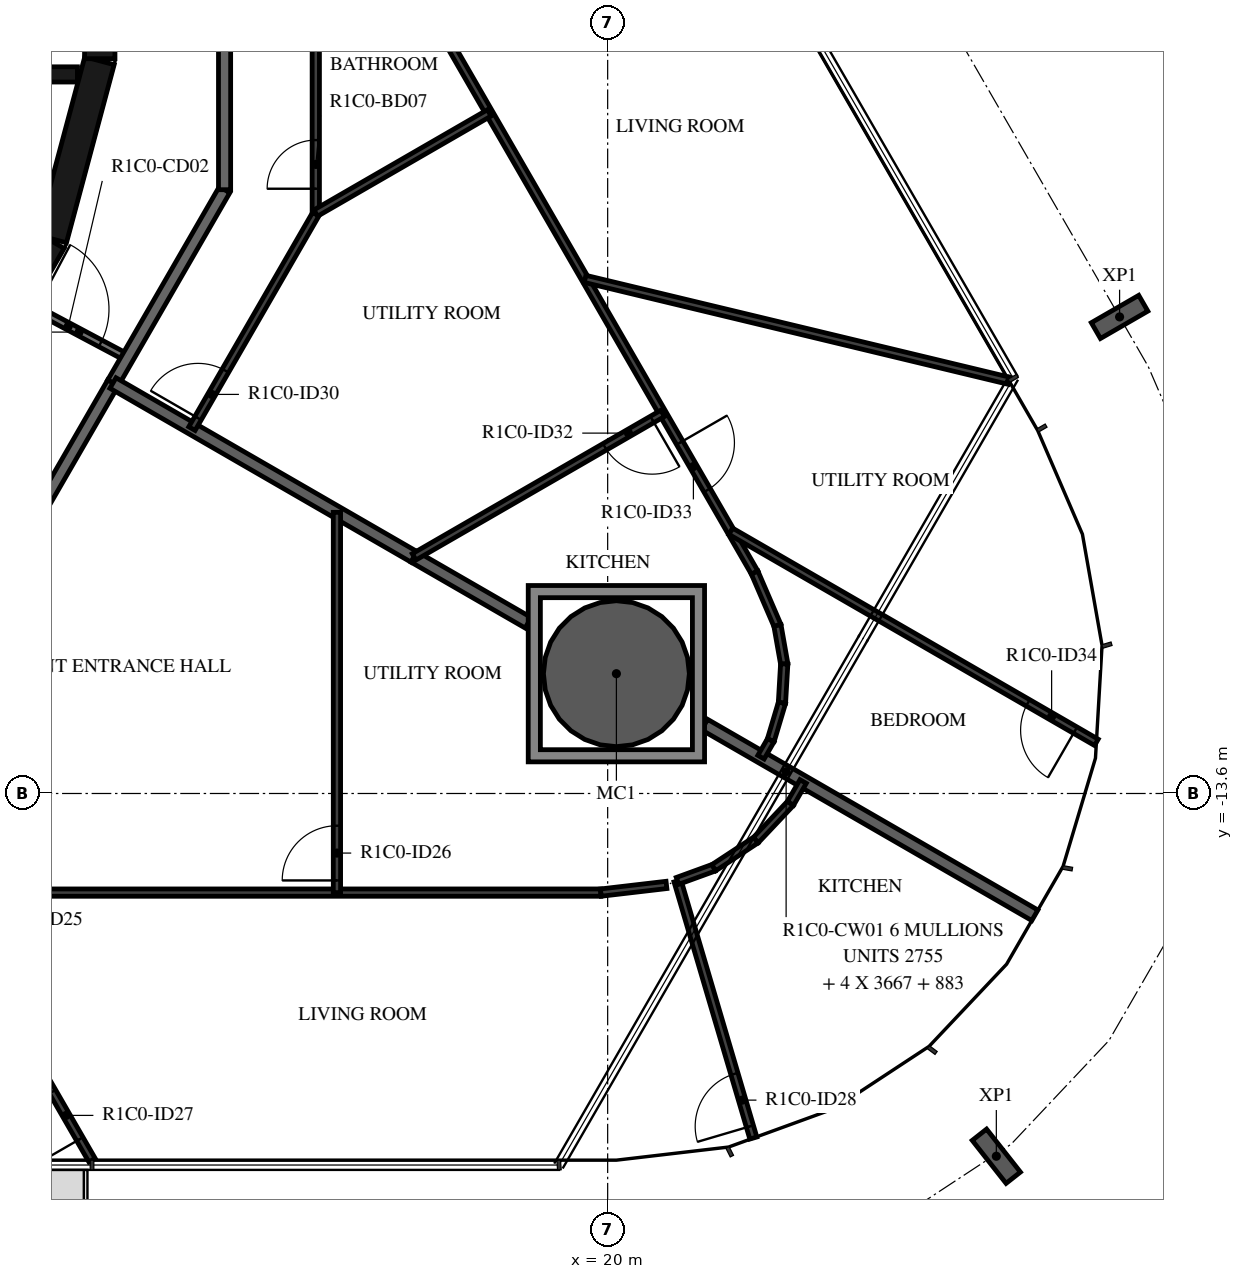
"""IFC4 building model, lengths in metres.
Left out: names, types, materials, properties, quantities, classifications, styles, units other than length and angle.
Written with IfcOpenShell. Run it as: python <this file> out.ifc"""

import sys

from ifc_helpers import new_model, si_unit, direction, frame, frame_2d, origin, origin_2d, place, context, subcontext, project, spatial, polyline, rectangle, hollow_circle, i_section, outline, extrude, element, fill, save


model = new_model("IFC4")
c1 = context("Model", 3, precision=1e-05, world=origin(), true_north=direction((0.0, 1.0)))
c2 = subcontext(c1, "Body", "Model", "MODEL_VIEW")
j1 = project(units=[si_unit("LENGTHUNIT", "METRE"), si_unit("PLANEANGLEUNIT", "RADIAN")], contexts=[c1])
p1 = place(None, origin())
s1 = spatial("IfcSite", under=j1, at=p1, CompositionType="ELEMENT")
p2 = place(p1, origin())
s2 = spatial("IfcBuilding", under=s1, at=p2, CompositionType="ELEMENT")
p3 = place(p2, frame((0.0, 0.0, 59.4)))
s3 = spatial("IfcBuildingStorey", under=s2, at=p3, CompositionType="ELEMENT", Elevation=59.4)
p4 = place(p3, frame((20.144, -11.63, -0.38), z_axis=(0.0, 0.0, 1.0), x_axis=(1.0, 0.0, 0.0)))
e1 = element("IfcColumn", 1, at=p4, inside=s3, PredefinedType="COLUMN", context=c2, shape_type="SweptSolid", body=[
    extrude(hollow_circle(Radius=1.2, WallThickness=0.06, at=origin_2d()), origin(), (0.0, 0.0, 1.0), 3.5),
])
for number, where, z_axis, x_axis in (
    (2, (26.392, -19.565, -0.38), (0.0, 0.0, 1.0), (-0.786, -0.619, 0.0)),
    (3, (28.419, -5.763, -0.38), (0.0, 0.0, 1.0), (0.5, -0.866, 0.0)),
):
    element("IfcColumn", number, at=place(p3, frame(where, z_axis=z_axis, x_axis=x_axis)), inside=s3, PredefinedType="COLUMN", context=c2, shape_type="SweptSolid", body=[
        extrude(i_section(OverallWidth=0.3, OverallDepth=0.9, WebThickness=0.019, FlangeThickness=0.035, FilletRadius=0.03, at=origin_2d()), origin(), (0.0, 0.0, 1.0), 3.5),
    ])
for number, where, z_axis, x_axis in (
    (4, (9.329, -7.137, 0.0), (0.0, 0.0, 1.0), (0.5, 0.866, 0.0)),
    (5, (10.858, -4.479, 0.0), (0.0, 0.0, 1.0), (0.259, 0.966, 0.0)),
):
    element("IfcWall", number, at=place(p3, frame(where, z_axis=z_axis, x_axis=x_axis)), inside=s3, PredefinedType="SHEAR", context=c2, shape_type="SweptSolid", body=[
        extrude(rectangle(XDim=3.033, YDim=0.5, at=frame_2d((1.516, 0.0))), origin(), (0.0, 0.0, 1.0), 3.12),
    ])
p5 = place(p3, frame((11.647, -1.516, 0.0), z_axis=(0.0, 0.0, 1.0), x_axis=(0.0, 1.0, 0.0)))
e6 = element("IfcWall", 6, at=p5, inside=s3, PredefinedType="SHEAR", context=c2, shape_type="SweptSolid", body=[
    extrude(rectangle(XDim=3.033, YDim=0.5, at=frame_2d((1.516, 0.0))), origin(), (0.0, 0.0, 1.0), 3.12),
])
p6 = place(p5, frame((0.616, 0.0, 0.0)))
e7 = element("IfcOpeningElement", 7, at=p6, cuts=e6, PredefinedType="OPENING", context=c2, shape_type="SweptSolid", body=[
    extrude(rectangle(XDim=1.8, YDim=2.1, at=frame_2d((0.9, 1.05))), frame((0.0, 0.26, 0.0), z_axis=(0.0, -1.0, 0.0), x_axis=(1.0, 0.0, 0.0)), (0.0, 0.0, 1.0), 0.52),
])
p7 = place(p3, frame((3.35, -1.775, 0.0), z_axis=(0.0, 0.0, 1.0), x_axis=(1.0, 0.0, 0.0)))
e8 = element("IfcWall", 8, at=p7, inside=s3, PredefinedType="SHEAR", context=c2, shape_type="SweptSolid", body=[
    extrude(rectangle(XDim=7.93, YDim=0.25, at=frame_2d((3.965, 0.0))), origin(), (0.0, 0.0, 1.0), 3.12),
])
p8 = place(p7, frame((0.4, 0.0, 0.0)))
e9 = element("IfcOpeningElement", 9, at=p8, cuts=e8, PredefinedType="OPENING", context=c2, shape_type="SweptSolid", body=[
    extrude(rectangle(XDim=1.1, YDim=2.4, at=frame_2d((0.55, 1.2))), frame((0.0, 0.135, 0.0), z_axis=(0.0, -1.0, 0.0), x_axis=(1.0, 0.0, 0.0)), (0.0, 0.0, 1.0), 0.27),
])
p9 = place(p7, frame((2.55, 0.0, 0.0)))
e10 = element("IfcOpeningElement", 10, at=p9, cuts=e8, PredefinedType="OPENING", context=c2, shape_type="SweptSolid", body=[
    extrude(rectangle(XDim=1.1, YDim=2.4, at=frame_2d((0.55, 1.2))), frame((0.0, 0.135, 0.0), z_axis=(0.0, -1.0, 0.0), x_axis=(1.0, 0.0, 0.0)), (0.0, 0.0, 1.0), 0.27),
])
p10 = place(p7, frame((4.7, 0.0, 0.0)))
e11 = element("IfcOpeningElement", 11, at=p10, cuts=e8, PredefinedType="OPENING", context=c2, shape_type="SweptSolid", body=[
    extrude(rectangle(XDim=1.1, YDim=2.4, at=frame_2d((0.55, 1.2))), frame((0.0, 0.135, 0.0), z_axis=(0.0, -1.0, 0.0), x_axis=(1.0, 0.0, 0.0)), (0.0, 0.0, 1.0), 0.27),
])
p11 = place(p3, frame((10.511, -5.589, 0.0), z_axis=(0.0, 0.0, 1.0), x_axis=(0.88294043061, -0.469485032769, 0.0)))
e12 = element("IfcWall", 12, at=p11, inside=s3, PredefinedType="PARTITIONING", context=c2, shape_type="SweptSolid", body=[
    extrude(rectangle(XDim=1.804, YDim=0.12, at=frame_2d((0.902, 0.0))), origin(), (0.0, 0.0, 1.0), 3.12),
])
p12 = place(p11, frame((0.1, 0.0, 0.0)))
e13 = element("IfcOpeningElement", 13, at=p12, cuts=e12, PredefinedType="OPENING", context=c2, shape_type="SweptSolid", body=[
    extrude(rectangle(XDim=1.2, YDim=2.1, at=frame_2d((0.6, 1.05))), frame((0.0, 0.07, 0.0), z_axis=(0.0, -1.0, 0.0), x_axis=(1.0, 0.0, 0.0)), (0.0, 0.0, 1.0), 0.14),
])
p13 = place(p3, frame((11.865, -6.85, 0.0), z_axis=(0.0, 0.0, 1.0), x_axis=(0.499987270552, 0.86603275301, 0.0)))
e14 = element("IfcWall", 14, at=p13, inside=s3, PredefinedType="STANDARD", context=c2, shape_type="SweptSolid", body=[
    extrude(rectangle(XDim=3.671, YDim=0.2, at=frame_2d((1.835, 0.0))), origin(), (0.0, 0.0, 1.0), 3.12),
])
p14 = place(p3, frame((13.7, -3.671, 0.0), z_axis=(0.0, 0.0, 1.0), x_axis=(0.0, 1.0, 0.0)))
e15 = element("IfcWall", 15, at=p14, inside=s3, PredefinedType="STANDARD", context=c2, shape_type="SweptSolid", body=[
    extrude(rectangle(XDim=7.146, YDim=0.2, at=frame_2d((3.573, 0.0))), origin(), (0.0, 0.0, 1.0), 3.12),
])
p15 = place(p14, frame((5.947, 0.0, 0.0)))
e16 = element("IfcOpeningElement", 16, at=p15, cuts=e15, PredefinedType="OPENING", context=c2, shape_type="SweptSolid", body=[
    extrude(rectangle(XDim=1.0, YDim=2.1, at=frame_2d((0.5, 1.05))), frame((0.0, 0.11, 0.0), z_axis=(0.0, -1.0, 0.0), x_axis=(1.0, 0.0, 0.0)), (0.0, 0.0, 1.0), 0.22),
])
p16 = place(p3, frame((10.029, -10.029, 0.0), z_axis=(0.0, 0.0, 1.0), x_axis=(0.50001606911, 0.866016126081, 0.0)))
e17 = element("IfcWall", 17, at=p16, inside=s3, PredefinedType="STANDARD", context=c2, shape_type="SweptSolid", body=[
    extrude(rectangle(XDim=3.671, YDim=0.2, at=frame_2d((1.835, 0.0))), origin(), (0.0, 0.0, 1.0), 3.12),
])
p17 = place(p3, frame((16.817, -9.709, 0.0), z_axis=(0.0, 0.0, 1.0), x_axis=(-0.86604338933, 0.499968846828, 0.0)))
e18 = element("IfcWall", 18, at=p17, inside=s3, PredefinedType="STANDARD", context=c2, shape_type="SweptSolid", body=[
    extrude(rectangle(XDim=5.718, YDim=0.2, at=frame_2d((2.859, 0.0))), origin(), (0.0, 0.0, 1.0), 3.12),
])
p18 = place(p3, frame((27.025, -15.603, 0.0), z_axis=(0.0, 0.0, 1.0), x_axis=(-0.866030653443, 0.499990907215, 0.0)))
e19 = element("IfcWall", 19, at=p18, inside=s3, PredefinedType="STANDARD", context=c2, shape_type="SweptSolid", body=[
    extrude(rectangle(XDim=6.271, YDim=0.2, at=frame_2d((3.136, 0.0))), origin(), (0.0, 0.0, 1.0), 3.12),
])
p19 = place(p3, frame((18.694, -10.793, 0.0), z_axis=(0.0, 0.0, 1.0), x_axis=(-0.866009251978, 0.500027974705, 0.0)))
e20 = element("IfcWall", 20, at=p19, inside=s3, PredefinedType="STANDARD", context=c2, shape_type="SweptSolid", body=[
    extrude(rectangle(XDim=2.167, YDim=0.2, at=frame_2d((1.084, 0.0))), origin(), (0.0, 0.0, 1.0), 3.12),
])
p20 = place(p3, frame((7.881, -15.23, 0.0), z_axis=(0.0, 0.0, 1.0), x_axis=(1.0, 0.0, 0.0)))
e21 = element("IfcWall", 21, at=p20, inside=s3, PredefinedType="PARTITIONING", context=c2, shape_type="SweptSolid", body=[
    extrude(rectangle(XDim=12.006, YDim=0.12, at=frame_2d((6.003, 0.0))), origin(), (0.0, 0.0, 1.0), 3.12),
])
p21 = place(p20, frame((1.499, 0.0, 0.0)))
e22 = element("IfcOpeningElement", 22, at=p21, cuts=e21, PredefinedType="OPENING", context=c2, shape_type="SweptSolid", body=[
    extrude(rectangle(XDim=0.9, YDim=2.1, at=frame_2d((0.45, 1.05))), frame((0.0, 0.07, 0.0), z_axis=(0.0, -1.0, 0.0), x_axis=(1.0, 0.0, 0.0)), (0.0, 0.0, 1.0), 0.14),
])
p22 = place(p3, frame((15.548, -15.23, 0.0), z_axis=(0.0, 0.0, 1.0), x_axis=(0.0, 1.0, 0.0)))
e23 = element("IfcWall", 23, at=p22, inside=s3, PredefinedType="PARTITIONING", context=c2, shape_type="SweptSolid", body=[
    extrude(rectangle(XDim=6.253, YDim=0.12, at=frame_2d((3.127, 0.0))), origin(), (0.0, 0.0, 1.0), 3.12),
])
p23 = place(p22, frame((0.2, 0.0, 0.0)))
e24 = element("IfcOpeningElement", 24, at=p23, cuts=e23, PredefinedType="OPENING", context=c2, shape_type="SweptSolid", body=[
    extrude(rectangle(XDim=0.9, YDim=2.1, at=frame_2d((0.45, 1.05))), frame((0.0, 0.07, 0.0), z_axis=(0.0, -1.0, 0.0), x_axis=(1.0, 0.0, 0.0)), (0.0, 0.0, 1.0), 0.14),
])
p24 = place(p3, frame((11.52, -19.63, 0.0), z_axis=(0.0, 0.0, 1.0), x_axis=(-0.499999763888, 0.866025540104, 0.0)))
e25 = element("IfcWall", 25, at=p24, inside=s3, PredefinedType="PARTITIONING", context=c2, shape_type="SweptSolid", body=[
    extrude(rectangle(XDim=5.081, YDim=0.12, at=frame_2d((2.54, 0.0))), origin(), (0.0, 0.0, 1.0), 3.12),
])
p25 = place(p24, frame((0.4, 0.0, 0.0)))
e26 = element("IfcOpeningElement", 26, at=p25, cuts=e25, PredefinedType="OPENING", context=c2, shape_type="SweptSolid", body=[
    extrude(rectangle(XDim=0.9, YDim=2.1, at=frame_2d((0.45, 1.05))), frame((0.0, 0.07, 0.0), z_axis=(0.0, -1.0, 0.0), x_axis=(1.0, 0.0, 0.0)), (0.0, 0.0, 1.0), 0.14),
])
p26 = place(p3, frame((20.967, -15.104, 0.0), z_axis=(0.0, 0.0, 1.0), x_axis=(-0.993231641151, -0.116150363826, 0.0)))
e27 = element("IfcWall", 27, at=p26, inside=s3, PredefinedType="PARTITIONING", context=c2, shape_type="SweptSolid", body=[
    extrude(rectangle(XDim=1.087, YDim=0.12, at=frame_2d((0.543, 0.0))), origin(), (0.0, 0.0, 1.0), 3.12),
])
p27 = place(p3, frame((22.396, -19.266, 0.0), z_axis=(0.0, 0.0, 1.0), x_axis=(-0.282873823334, 0.959157130022, 0.0)))
e28 = element("IfcWall", 28, at=p27, inside=s3, PredefinedType="PARTITIONING", context=c2, shape_type="SweptSolid", body=[
    extrude(rectangle(XDim=4.409, YDim=0.12, at=frame_2d((2.204, 0.0))), origin(), (0.0, 0.0, 1.0), 3.12),
])
p28 = place(p27, frame((0.2, 0.0, 0.0)))
e29 = element("IfcOpeningElement", 29, at=p28, cuts=e28, PredefinedType="OPENING", context=c2, shape_type="SweptSolid", body=[
    extrude(rectangle(XDim=0.9, YDim=2.1, at=frame_2d((0.45, 1.05))), frame((0.0, 0.07, 0.0), z_axis=(0.0, -1.0, 0.0), x_axis=(1.0, 0.0, 0.0)), (0.0, 0.0, 1.0), 0.14),
])
p29 = place(p3, frame((21.149, -15.038, 0.0), z_axis=(0.0, 0.0, 1.0), x_axis=(0.939726102094, 0.341928140173, 0.0)))
e30 = element("IfcWall", 30, at=p29, inside=s3, PredefinedType="PARTITIONING", context=c2, shape_type="SweptSolid", body=[
    extrude(rectangle(XDim=0.635, YDim=0.12, at=frame_2d((0.318, 0.0))), origin(), (0.0, 0.0, 1.0), 3.12),
])
p30 = place(p3, frame((21.746, -14.82, 0.0), z_axis=(0.0, 0.0, 1.0), x_axis=(0.835477570013, 0.549524549046, 0.0)))
e31 = element("IfcWall", 31, at=p30, inside=s3, PredefinedType="PARTITIONING", context=c2, shape_type="SweptSolid", body=[
    extrude(rectangle(XDim=0.829, YDim=0.12, at=frame_2d((0.415, 0.0))), origin(), (0.0, 0.0, 1.0), 3.12),
])
p31 = place(p3, frame((22.438, -14.365, 0.0), z_axis=(0.0, 0.0, 1.0), x_axis=(0.686182189596, 0.727429723535, 0.0)))
e32 = element("IfcWall", 32, at=p31, inside=s3, PredefinedType="PARTITIONING", context=c2, shape_type="SweptSolid", body=[
    extrude(rectangle(XDim=0.829, YDim=0.12, at=frame_2d((0.414, 0.0))), origin(), (0.0, 0.0, 1.0), 3.12),
])
p32 = place(p3, frame((23.007, -13.762, 0.0), z_axis=(0.0, 0.0, 1.0), x_axis=(0.499875358948, 0.866097353371, 0.0)))
e33 = element("IfcWall", 33, at=p32, inside=s3, PredefinedType="PARTITIONING", context=c2, shape_type="SweptSolid", body=[
    extrude(rectangle(XDim=0.415, YDim=0.12, at=frame_2d((0.207, 0.0))), origin(), (0.0, 0.0, 1.0), 3.12),
])
p33 = place(p3, frame((13.164, -7.6, 0.0), z_axis=(0.0, 0.0, 1.0), x_axis=(0.499974973053, 0.866039852617, 0.0)))
e34 = element("IfcWall", 34, at=p33, inside=s3, PredefinedType="PARTITIONING", context=c2, shape_type="SweptSolid", body=[
    extrude(rectangle(XDim=4.073, YDim=0.12, at=frame_2d((2.037, 0.0))), origin(), (0.0, 0.0, 1.0), 3.12),
])
p34 = place(p33, frame((0.2, 0.0, 0.0)))
e35 = element("IfcOpeningElement", 35, at=p34, cuts=e34, PredefinedType="OPENING", context=c2, shape_type="SweptSolid", body=[
    extrude(rectangle(XDim=0.9, YDim=2.1, at=frame_2d((0.45, 1.05))), frame((0.0, 0.07, 0.0), z_axis=(0.0, -1.0, 0.0), x_axis=(1.0, 0.0, 0.0)), (0.0, 0.0, 1.0), 0.14),
])
p35 = place(p3, frame((15.2, -4.055, 0.0), z_axis=(0.0, 0.0, 1.0), x_axis=(0.0, 1.0, 0.0)))
e36 = element("IfcWall", 36, at=p35, inside=s3, PredefinedType="PARTITIONING", context=c2, shape_type="SweptSolid", body=[
    extrude(rectangle(XDim=6.588, YDim=0.12, at=frame_2d((3.294, 0.0))), origin(), (0.0, 0.0, 1.0), 3.12),
])
p36 = place(p35, frame((0.4, 0.0, 0.0)))
e37 = element("IfcOpeningElement", 37, at=p36, cuts=e36, PredefinedType="OPENING", context=c2, shape_type="SweptSolid", body=[
    extrude(rectangle(XDim=0.8, YDim=2.1, at=frame_2d((0.4, 1.05))), frame((0.0, 0.07, 0.0), z_axis=(0.0, -1.0, 0.0), x_axis=(1.0, 0.0, 0.0)), (0.0, 0.0, 1.0), 0.14),
])
p37 = place(p3, frame((15.2, 2.533, 0.0), z_axis=(0.0, 0.0, 1.0), x_axis=(0.500001127339, -0.866024752914, 0.0)))
e38 = element("IfcWall", 38, at=p37, inside=s3, PredefinedType="PARTITIONING", context=c2, shape_type="SweptSolid", body=[
    extrude(rectangle(XDim=14.434, YDim=0.12, at=frame_2d((7.217, 0.0))), origin(), (0.0, 0.0, 1.0), 3.12),
])
p38 = place(p37, frame((11.97, 0.0, 0.0)))
e39 = element("IfcOpeningElement", 39, at=p38, cuts=e38, PredefinedType="OPENING", context=c2, shape_type="SweptSolid", body=[
    extrude(rectangle(XDim=0.9, YDim=2.1, at=frame_2d((0.45, 1.05))), frame((0.0, 0.07, 0.0), z_axis=(0.0, -1.0, 0.0), x_axis=(1.0, 0.0, 0.0)), (0.0, 0.0, 1.0), 0.14),
])
p39 = place(p3, frame((22.417, -9.968, 0.0), z_axis=(0.0, 0.0, 1.0), x_axis=(0.395971779074, -0.918262680379, 0.0)))
e40 = element("IfcWall", 40, at=p39, inside=s3, PredefinedType="PARTITIONING", context=c2, shape_type="SweptSolid", body=[
    extrude(rectangle(XDim=0.947, YDim=0.12, at=frame_2d((0.474, 0.0))), origin(), (0.0, 0.0, 1.0), 3.12),
])
p40 = place(p3, frame((22.792, -10.837, 0.0), z_axis=(0.0, 0.0, 1.0), x_axis=(0.17382873157, -0.984775899421, 0.0)))
e41 = element("IfcWall", 41, at=p40, inside=s3, PredefinedType="PARTITIONING", context=c2, shape_type="SweptSolid", body=[
    extrude(rectangle(XDim=0.642, YDim=0.12, at=frame_2d((0.321, 0.0))), origin(), (0.0, 0.0, 1.0), 3.12),
])
p41 = place(p3, frame((22.904, -11.469, 0.0), z_axis=(0.0, 0.0, 1.0), x_axis=(-0.05820906079, -0.998304415117, 0.0)))
e42 = element("IfcWall", 42, at=p41, inside=s3, PredefinedType="PARTITIONING", context=c2, shape_type="SweptSolid", body=[
    extrude(rectangle(XDim=0.642, YDim=0.12, at=frame_2d((0.321, 0.0))), origin(), (0.0, 0.0, 1.0), 3.12),
])
p42 = place(p3, frame((22.866, -12.11, 0.0), z_axis=(0.0, 0.0, 1.0), x_axis=(-0.286754684479, -0.958004045362, 0.0)))
e43 = element("IfcWall", 43, at=p42, inside=s3, PredefinedType="PARTITIONING", context=c2, shape_type="SweptSolid", body=[
    extrude(rectangle(XDim=0.642, YDim=0.12, at=frame_2d((0.321, 0.0))), origin(), (0.0, 0.0, 1.0), 3.12),
])
p43 = place(p3, frame((22.682, -12.725, 0.0), z_axis=(0.0, 0.0, 1.0), x_axis=(-0.500226934229, -0.865894343596, 0.0)))
e44 = element("IfcWall", 44, at=p43, inside=s3, PredefinedType="PARTITIONING", context=c2, shape_type="SweptSolid", body=[
    extrude(rectangle(XDim=0.321, YDim=0.12, at=frame_2d((0.161, 0.0))), origin(), (0.0, 0.0, 1.0), 3.12),
])
p44 = place(p3, frame((28.037, -12.759, 0.0), z_axis=(0.0, 0.0, 1.0), x_axis=(-0.866009909538, 0.500026835863, 0.0)))
e45 = element("IfcWall", 45, at=p44, inside=s3, PredefinedType="PARTITIONING", context=c2, shape_type="SweptSolid", body=[
    extrude(rectangle(XDim=6.943, YDim=0.12, at=frame_2d((3.471, 0.0))), origin(), (0.0, 0.0, 1.0), 3.12),
])
p45 = place(p44, frame((0.4, 0.0, 0.0)))
e46 = element("IfcOpeningElement", 46, at=p45, cuts=e45, PredefinedType="OPENING", context=c2, shape_type="SweptSolid", body=[
    extrude(rectangle(XDim=0.9, YDim=2.1, at=frame_2d((0.45, 1.05))), frame((0.0, 0.07, 0.0), z_axis=(0.0, -1.0, 0.0), x_axis=(1.0, 0.0, 0.0)), (0.0, 0.0, 1.0), 0.14),
])
p46 = place(p3, frame((20.905, -7.349, 0.0), z_axis=(0.0, 0.0, 1.0), x_axis=(-0.866032292145, -0.49998806882, 0.0)))
e47 = element("IfcWall", 47, at=p46, inside=s3, PredefinedType="PARTITIONING", context=c2, shape_type="SweptSolid", body=[
    extrude(rectangle(XDim=4.721, YDim=0.12, at=frame_2d((2.36, 0.0))), origin(), (0.0, 0.0, 1.0), 3.12),
])
p47 = place(p46, frame((0.2, 0.0, 0.0)))
e48 = element("IfcOpeningElement", 48, at=p47, cuts=e47, PredefinedType="OPENING", context=c2, shape_type="SweptSolid", body=[
    extrude(rectangle(XDim=0.9, YDim=2.1, at=frame_2d((0.45, 1.05))), frame((0.0, 0.07, 0.0), z_axis=(0.0, -1.0, 0.0), x_axis=(1.0, 0.0, 0.0)), (0.0, 0.0, 1.0), 0.14),
])
p48 = place(p3, frame((18.052, -2.408, 0.0), z_axis=(0.0, 0.0, 1.0), x_axis=(-0.866017718408, -0.500013311227, 0.0)))
e49 = element("IfcWall", 49, at=p48, inside=s3, PredefinedType="PARTITIONING", context=c2, shape_type="SweptSolid", body=[
    extrude(rectangle(XDim=3.294, YDim=0.12, at=frame_2d((1.647, 0.0))), origin(), (0.0, 0.0, 1.0), 3.12),
])
p49 = place(p3, frame((26.6, -6.813, 0.0), z_axis=(0.0, 0.0, 1.0), x_axis=(-0.972307508101, 0.23370517686, 0.0)))
e50 = element("IfcWall", 50, at=p49, inside=s3, PredefinedType="PARTITIONING", context=c2, shape_type="SweptSolid", body=[
    extrude(rectangle(XDim=7.17, YDim=0.12, at=frame_2d((3.585, 0.0))), origin(), (0.0, 0.0, 1.0), 3.12),
])
p50 = place(p3, origin())
e51 = element("IfcWall", 51, at=p50, inside=s3, PredefinedType="STANDARD", context=c2, shape_type="SweptSolid", body=[
    extrude(outline(polyline([(21.594, -10.18), (21.594, -13.08), (18.694, -13.08), (18.694, -10.18), (21.594, -10.18)]), holes=[polyline([(18.894, -12.88), (21.394, -12.88), (21.394, -10.38), (18.894, -10.38), (18.894, -12.88)])]), origin(), (0.0, 0.0, 1.0), 3.12),
])
p51 = place(p23, origin())
e52 = element("IfcDoor", 52, at=p51, inside=s3, OperationType="SINGLE_SWING_RIGHT", PredefinedType="DOOR", context=c2, shape_type="SweptSolid", body=[
    extrude(rectangle(XDim=0.9, YDim=2.1, at=frame_2d((0.45, 1.05))), frame((0.0, 0.025, 0.0), z_axis=(0.0, -1.0, 0.0), x_axis=(1.0, 0.0, 0.0)), (0.0, 0.0, 1.0), 0.05),
])
fill(e24, e52)
p52 = place(p25, origin())
e53 = element("IfcDoor", 53, at=p52, inside=s3, OperationType="SINGLE_SWING_LEFT", PredefinedType="DOOR", context=c2, shape_type="SweptSolid", body=[
    extrude(rectangle(XDim=0.9, YDim=2.1, at=frame_2d((0.45, 1.05))), frame((0.0, 0.025, 0.0), z_axis=(0.0, -1.0, 0.0), x_axis=(1.0, 0.0, 0.0)), (0.0, 0.0, 1.0), 0.05),
])
fill(e26, e53)
p53 = place(p28, origin())
e54 = element("IfcDoor", 54, at=p53, inside=s3, OperationType="SINGLE_SWING_RIGHT", PredefinedType="DOOR", context=c2, shape_type="SweptSolid", body=[
    extrude(rectangle(XDim=0.9, YDim=2.1, at=frame_2d((0.45, 1.05))), frame((0.0, 0.025, 0.0), z_axis=(0.0, -1.0, 0.0), x_axis=(1.0, 0.0, 0.0)), (0.0, 0.0, 1.0), 0.05),
])
fill(e29, e54)
p54 = place(p34, origin())
e55 = element("IfcDoor", 55, at=p54, inside=s3, OperationType="SINGLE_SWING_LEFT", PredefinedType="DOOR", context=c2, shape_type="SweptSolid", body=[
    extrude(rectangle(XDim=0.9, YDim=2.1, at=frame_2d((0.45, 1.05))), frame((0.0, 0.025, 0.0), z_axis=(0.0, -1.0, 0.0), x_axis=(1.0, 0.0, 0.0)), (0.0, 0.0, 1.0), 0.05),
])
fill(e35, e55)
p55 = place(p36, origin())
e56 = element("IfcDoor", 56, at=p55, inside=s3, OperationType="SINGLE_SWING_LEFT", PredefinedType="DOOR", context=c2, shape_type="SweptSolid", body=[
    extrude(rectangle(XDim=0.8, YDim=2.1, at=frame_2d((0.4, 1.05))), frame((0.0, 0.025, 0.0), z_axis=(0.0, -1.0, 0.0), x_axis=(1.0, 0.0, 0.0)), (0.0, 0.0, 1.0), 0.05),
])
fill(e37, e56)
p56 = place(p47, origin())
e57 = element("IfcDoor", 57, at=p56, inside=s3, OperationType="SINGLE_SWING_LEFT", PredefinedType="DOOR", context=c2, shape_type="SweptSolid", body=[
    extrude(rectangle(XDim=0.9, YDim=2.1, at=frame_2d((0.45, 1.05))), frame((0.0, 0.025, 0.0), z_axis=(0.0, -1.0, 0.0), x_axis=(1.0, 0.0, 0.0)), (0.0, 0.0, 1.0), 0.05),
])
fill(e48, e57)
p57 = place(p38, origin())
e58 = element("IfcDoor", 58, at=p57, inside=s3, OperationType="SINGLE_SWING_LEFT", PredefinedType="DOOR", context=c2, shape_type="SweptSolid", body=[
    extrude(rectangle(XDim=0.9, YDim=2.1, at=frame_2d((0.45, 1.05))), frame((0.0, 0.025, 0.0), z_axis=(0.0, -1.0, 0.0), x_axis=(1.0, 0.0, 0.0)), (0.0, 0.0, 1.0), 0.05),
])
fill(e39, e58)
p58 = place(p45, origin())
e59 = element("IfcDoor", 59, at=p58, inside=s3, OperationType="SINGLE_SWING_LEFT", PredefinedType="DOOR", context=c2, shape_type="SweptSolid", body=[
    extrude(rectangle(XDim=0.9, YDim=2.1, at=frame_2d((0.45, 1.05))), frame((0.0, 0.025, 0.0), z_axis=(0.0, -1.0, 0.0), x_axis=(1.0, 0.0, 0.0)), (0.0, 0.0, 1.0), 0.05),
])
fill(e46, e59)
p59 = place(p12, origin())
e60 = element("IfcDoor", 60, at=p59, inside=s3, OperationType="DOUBLE_DOOR_SINGLE_SWING", PredefinedType="DOOR", context=c2, shape_type="SweptSolid", body=[
    extrude(rectangle(XDim=1.2, YDim=2.1, at=frame_2d((0.6, 1.05))), frame((0.0, 0.025, 0.0), z_axis=(0.0, -1.0, 0.0), x_axis=(1.0, 0.0, 0.0)), (0.0, 0.0, 1.0), 0.05),
])
fill(e13, e60)
save(model, sys.argv[1])
